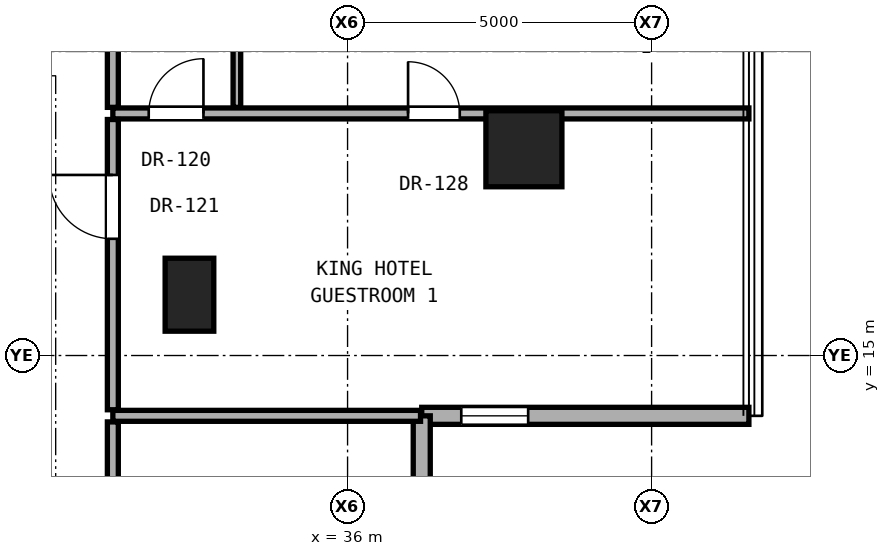
"""IFC4 building model, lengths in metres.
Left out: names, types, materials, properties, quantities, classifications, styles, units other than length and angle.
Written with IfcOpenShell. Run it as: python <this file> out.ifc"""

import sys

from ifc_helpers import new_model, si_unit, direction, frame, frame_2d, origin, origin_2d, place, context, subcontext, project, spatial, rectangle, hollow_rectangle, extrude, element, fill, save


model = new_model("IFC4")
c1 = context("Model", 3, precision=1e-05, world=origin(), true_north=direction((0.0, 1.0)))
c2 = subcontext(c1, "Body", "Model", "MODEL_VIEW")
j1 = project(units=[si_unit("LENGTHUNIT", "METRE"), si_unit("PLANEANGLEUNIT", "RADIAN")], contexts=[c1])
p1 = place(None, origin())
s1 = spatial("IfcSite", under=j1, at=p1, CompositionType="ELEMENT")
p2 = place(p1, origin())
s2 = spatial("IfcBuilding", under=s1, at=p2, CompositionType="ELEMENT")
p3 = place(p2, frame((0.0, 0.0, 35.6)))
s3 = spatial("IfcBuildingStorey", under=s2, at=p3, CompositionType="ELEMENT", Elevation=35.6)
p4 = place(p3, frame((38.9, 18.4, 0.0), z_axis=(0.0, 0.0, 1.0), x_axis=(1.0, 0.0, 0.0)))
e1 = element("IfcColumn", 1, at=p4, inside=s3, PredefinedType="COLUMN", context=c2, shape_type="SweptSolid", body=[
    extrude(hollow_rectangle(XDim=1.25, YDim=1.25, WallThickness=0.07, at=origin_2d()), origin(), (0.0, 0.0, 1.0), 3.3),
])
p5 = place(p3, frame((33.4, 16.0, 0.0), z_axis=(0.0, 0.0, 1.0), x_axis=(1.0, 0.0, 0.0)))
e2 = element("IfcColumn", 2, at=p5, inside=s3, PredefinedType="PILASTER", context=c2, shape_type="SweptSolid", body=[
    extrude(rectangle(XDim=0.8, YDim=1.2, at=origin_2d()), origin(), (0.0, 0.0, 1.0), 3.3),
])
p6 = place(p3, frame((37.22, 14.008, 0.0), z_axis=(0.0, 0.0, 1.0), x_axis=(1.0, 0.0, 0.0)))
e3 = element("IfcWall", 3, at=p6, inside=s3, PredefinedType="SOLIDWALL", context=c2, shape_type="SweptSolid", body=[
    extrude(rectangle(XDim=5.38, YDim=0.28, at=frame_2d((2.69, 0.0))), origin(), (0.0, 0.0, 1.0), 3.04),
])
p7 = place(p6, frame((0.65, 0.0, 0.85)))
e4 = element("IfcOpeningElement", 4, at=p7, cuts=e3, PredefinedType="OPENING", context=c2, shape_type="SweptSolid", body=[
    extrude(rectangle(XDim=1.1, YDim=2.0, at=frame_2d((0.55, 1.0))), frame((0.0, 0.15, 0.0), z_axis=(0.0, -1.0, 0.0), x_axis=(1.0, 0.0, 0.0)), (0.0, 0.0, 1.0), 0.3),
])
p8 = place(p3, frame((37.22, 8.628, 0.0), z_axis=(0.0, 0.0, 1.0), x_axis=(0.0, 1.0, 0.0)))
e5 = element("IfcWall", 5, at=p8, inside=s3, PredefinedType="SOLIDWALL", context=c2, shape_type="SweptSolid", body=[
    extrude(rectangle(XDim=5.38, YDim=0.28, at=frame_2d((2.69, 0.0))), origin(), (0.0, 0.0, 1.0), 3.04),
])
p9 = place(p3, frame((32.14, 14.008, 0.0), z_axis=(0.0, 0.0, 1.0), x_axis=(1.0, 0.0, 0.0)))
e6 = element("IfcWall", 6, at=p9, inside=s3, PredefinedType="PARTITIONING", context=c2, shape_type="SweptSolid", body=[
    extrude(rectangle(XDim=5.06, YDim=0.18, at=frame_2d((2.53, 0.0))), origin(), (0.0, 0.0, 1.0), 3.06),
])
p10 = place(p3, frame((32.14, 18.981, 0.0), z_axis=(0.0, 0.0, 1.0), x_axis=(1.0, 0.0, 0.0)))
e7 = element("IfcWall", 7, at=p10, inside=s3, PredefinedType="PARTITIONING", context=c2, shape_type="SweptSolid", body=[
    extrude(rectangle(XDim=10.46, YDim=0.18, at=frame_2d((5.23, 0.0))), origin(), (0.0, 0.0, 1.0), 2.125),
])
p11 = place(p10, frame((4.855, 0.0, 0.0)))
e8 = element("IfcOpeningElement", 8, at=p11, cuts=e7, PredefinedType="OPENING", context=c2, shape_type="SweptSolid", body=[
    extrude(rectangle(XDim=0.85, YDim=2.01, at=frame_2d((0.425, 1.005))), frame((0.0, 0.1, 0.0), z_axis=(0.0, -1.0, 0.0), x_axis=(1.0, 0.0, 0.0)), (0.0, 0.0, 1.0), 0.2),
])
p12 = place(p10, frame((0.59, 0.0, 0.0)))
e9 = element("IfcOpeningElement", 9, at=p12, cuts=e7, PredefinedType="OPENING", context=c2, shape_type="SweptSolid", body=[
    extrude(rectangle(XDim=0.9, YDim=2.1, at=frame_2d((0.45, 1.05))), frame((0.0, 0.1, 0.0), z_axis=(0.0, -1.0, 0.0), x_axis=(1.0, 0.0, 0.0)), (0.0, 0.0, 1.0), 0.2),
])
p13 = place(p3, frame((32.14, 8.628, 0.0), z_axis=(0.0, 0.0, 1.0), x_axis=(0.0, 1.0, 0.0)))
e10 = element("IfcWall", 10, at=p13, inside=s3, PredefinedType="PARTITIONING", context=c2, shape_type="SweptSolid", body=[
    extrude(rectangle(XDim=5.28, YDim=0.18, at=frame_2d((2.64, 0.0))), origin(), (0.0, 0.0, 1.0), 3.06),
])
p14 = place(p13, frame((2.165, 0.0, 0.0)))
e11 = element("IfcOpeningElement", 11, at=p14, cuts=e10, PredefinedType="OPENING", context=c2, shape_type="SweptSolid", body=[
    extrude(rectangle(XDim=0.95, YDim=2.15, at=frame_2d((0.475, 1.075))), frame((0.0, 0.1, 0.0), z_axis=(0.0, -1.0, 0.0), x_axis=(1.0, 0.0, 0.0)), (0.0, 0.0, 1.0), 0.2),
])
p15 = place(p3, frame((32.14, 14.108, 0.0), z_axis=(0.0, 0.0, 1.0), x_axis=(0.0, 1.0, 0.0)))
e12 = element("IfcWall", 12, at=p15, inside=s3, PredefinedType="PARTITIONING", context=c2, shape_type="SweptSolid", body=[
    extrude(rectangle(XDim=4.773, YDim=0.18, at=frame_2d((2.387, 0.0))), origin(), (0.0, 0.0, 1.0), 2.436),
])
p16 = place(p15, frame((2.812, 0.0, 0.0)))
e13 = element("IfcOpeningElement", 13, at=p16, cuts=e12, PredefinedType="OPENING", context=c2, shape_type="SweptSolid", body=[
    extrude(rectangle(XDim=1.05, YDim=2.2, at=frame_2d((0.525, 1.1))), frame((0.0, 0.1, 0.0), z_axis=(0.0, -1.0, 0.0), x_axis=(1.0, 0.0, 0.0)), (0.0, 0.0, 1.0), 0.2),
])
p17 = place(p3, frame((32.14, 19.081, 0.0), z_axis=(0.0, 0.0, 1.0), x_axis=(0.0, 1.0, 0.0)))
e14 = element("IfcWall", 14, at=p17, inside=s3, PredefinedType="PARTITIONING", context=c2, shape_type="SweptSolid", body=[
    extrude(rectangle(XDim=2.547, YDim=0.18, at=frame_2d((1.274, 0.0))), origin(), (0.0, 0.0, 1.0), 3.06),
])
p18 = place(p3, frame((34.18, 19.081, 0.0), z_axis=(0.0, 0.0, 1.0), x_axis=(0.0, 1.0, 0.0)))
e15 = element("IfcWall", 15, at=p18, inside=s3, PredefinedType="PARTITIONING", context=c2, shape_type="SweptSolid", body=[
    extrude(rectangle(XDim=2.547, YDim=0.125, at=frame_2d((1.274, 0.0))), origin(), (0.0, 0.0, 1.0), 3.06),
])
p19 = place(p7, origin())
e16 = element("IfcWindow", 16, at=p19, inside=s3, PartitioningType="SINGLE_PANEL", PredefinedType="WINDOW", context=c2, shape_type="SweptSolid", body=[
    extrude(rectangle(XDim=1.1, YDim=2.0, at=frame_2d((0.55, 1.0))), frame((0.0, 0.03, 0.0), z_axis=(0.0, -1.0, 0.0), x_axis=(1.0, 0.0, 0.0)), (0.0, 0.0, 1.0), 0.06),
])
fill(e4, e16)
p20 = place(p16, origin())
e17 = element("IfcDoor", 17, at=p20, inside=s3, OperationType="SINGLE_SWING_RIGHT", PredefinedType="DOOR", context=c2, shape_type="SweptSolid", body=[
    extrude(rectangle(XDim=1.05, YDim=2.2, at=frame_2d((0.525, 1.1))), frame((0.0, 0.025, 0.0), z_axis=(0.0, -1.0, 0.0), x_axis=(1.0, 0.0, 0.0)), (0.0, 0.0, 1.0), 0.05),
])
fill(e13, e17)
p21 = place(p11, origin())
e18 = element("IfcDoor", 18, at=p21, inside=s3, OperationType="SINGLE_SWING_LEFT", PredefinedType="DOOR", context=c2, shape_type="SweptSolid", body=[
    extrude(rectangle(XDim=0.85, YDim=2.01, at=frame_2d((0.425, 1.005))), frame((0.0, 0.025, 0.0), z_axis=(0.0, -1.0, 0.0), x_axis=(1.0, 0.0, 0.0)), (0.0, 0.0, 1.0), 0.05),
])
fill(e8, e18)
p22 = place(p12, origin())
e19 = element("IfcDoor", 19, at=p22, inside=s3, OperationType="SINGLE_SWING_RIGHT", PredefinedType="DOOR", context=c2, shape_type="SweptSolid", body=[
    extrude(rectangle(XDim=0.9, YDim=2.1, at=frame_2d((0.45, 1.05))), frame((0.0, 0.025, 0.0), z_axis=(0.0, -1.0, 0.0), x_axis=(1.0, 0.0, 0.0)), (0.0, 0.0, 1.0), 0.05),
])
fill(e9, e19)
save(model, sys.argv[1])
